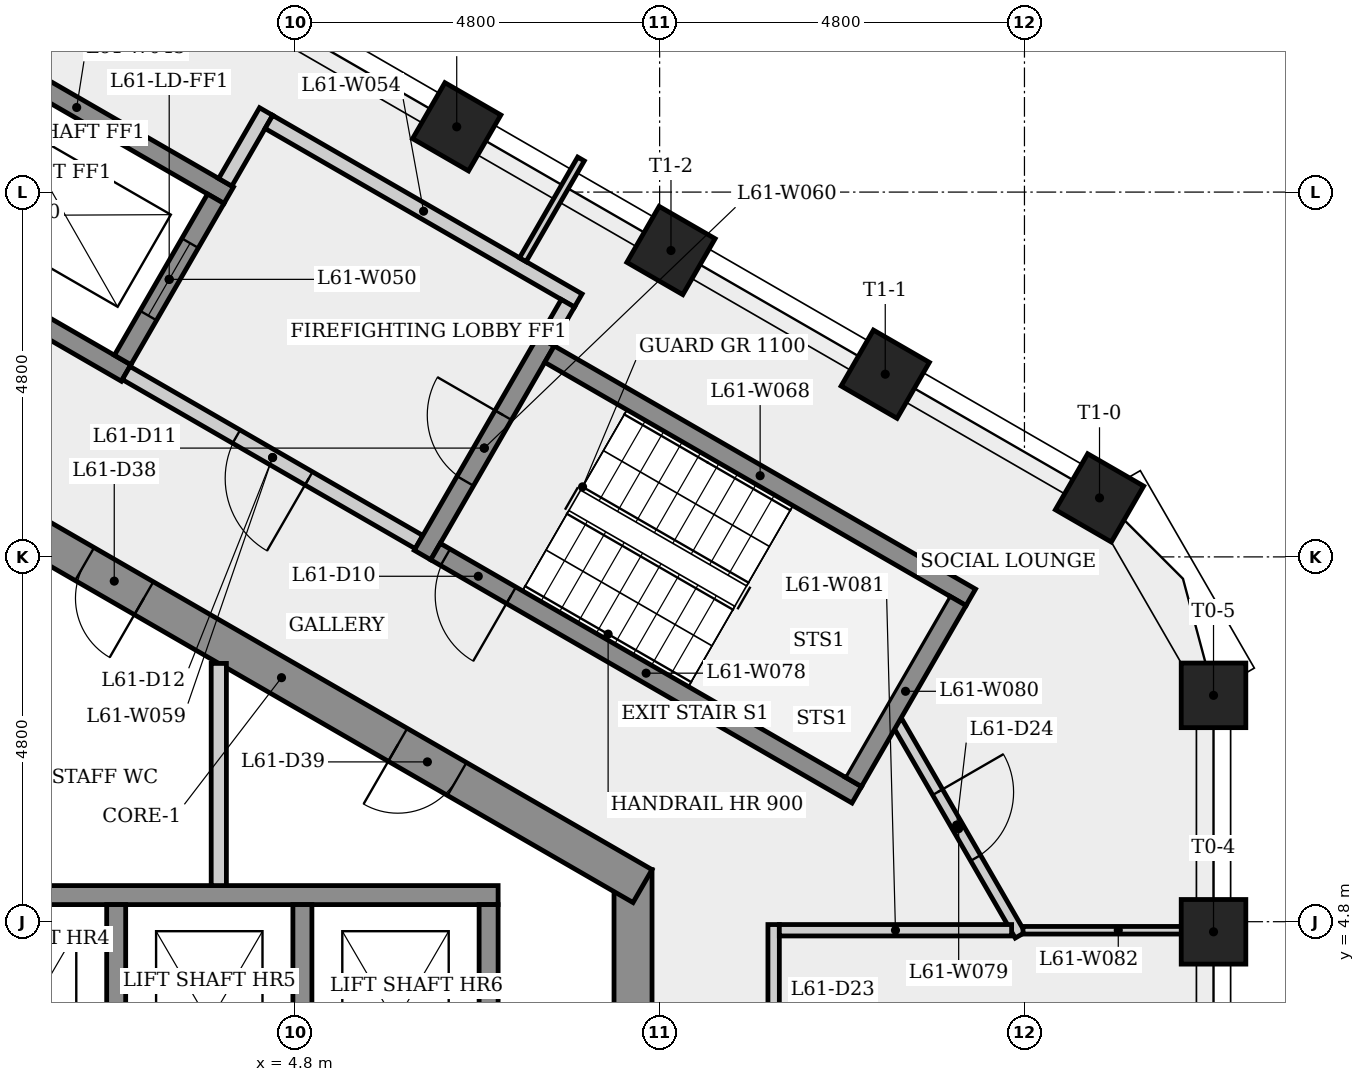
"""IFC4 building model, lengths in metres.
Left out: names, types, materials, properties, quantities, classifications, styles, units other than length and angle.
Written with IfcOpenShell. Run it as: python <this file> out.ifc"""

import sys

from ifc_helpers import new_model, si_unit, direction, frame, frame_2d, origin, origin_2d, place, context, subcontext, project, spatial, rectangle, extrude, element, fill, save


model = new_model("IFC4")
c1 = context("Model", 3, precision=1e-05, world=origin(), true_north=direction((0.0, 1.0)))
c2 = subcontext(c1, "Body", "Model", "MODEL_VIEW")
j1 = project(units=[si_unit("LENGTHUNIT", "METRE"), si_unit("PLANEANGLEUNIT", "RADIAN")], contexts=[c1])
p1 = place(None, origin())
s1 = spatial("IfcSite", under=j1, at=p1, CompositionType="ELEMENT")
p2 = place(p1, origin())
s2 = spatial("IfcBuilding", under=s1, at=p2, CompositionType="ELEMENT")
p3 = place(p2, frame((0.0, 0.0, 229.1)))
s3 = spatial("IfcBuildingStorey", under=s2, at=p3, CompositionType="ELEMENT", Elevation=229.1)
p4 = place(p3, frame((9.25, -5.485, 0.0), z_axis=(0.0, 0.0, 1.0), x_axis=(0.0, 1.0, 0.0)))
e1 = element("IfcWall", 1, at=p4, inside=s3, PredefinedType="SHEAR", context=c2, shape_type="SweptSolid", body=[
    extrude(rectangle(XDim=10.97, YDim=0.5, at=frame_2d((5.485, 0.0))), origin(), (0.0, 0.0, 1.0), 3.4),
])
p5 = place(p4, frame((4.685, 0.0, 0.0)))
e2 = element("IfcOpeningElement", 2, at=p5, cuts=e1, PredefinedType="OPENING", context=c2, shape_type="SweptSolid", body=[
    extrude(rectangle(XDim=1.6, YDim=2.1, at=frame_2d((0.8, 1.05))), frame((0.0, 0.26, 0.0), z_axis=(0.0, -1.0, 0.0), x_axis=(1.0, 0.0, 0.0)), (0.0, 0.0, 1.0), 0.52),
])
p6 = place(p3, frame((9.375, 5.268, 0.0), z_axis=(0.0, 0.0, 1.0), x_axis=(-0.866023993627, 0.500002442456, 0.0)))
e3 = element("IfcWall", 3, at=p6, inside=s3, PredefinedType="SHEAR", context=c2, shape_type="SweptSolid", body=[
    extrude(rectangle(XDim=10.97, YDim=0.5, at=frame_2d((5.485, 0.0))), origin(), (0.0, 0.0, 1.0), 3.4),
])
p7 = place(p6, frame((7.576, 0.0, 0.0)))
e4 = element("IfcOpeningElement", 4, at=p7, cuts=e3, PredefinedType="OPENING", context=c2, shape_type="SweptSolid", body=[
    extrude(rectangle(XDim=0.9, YDim=2.1, at=frame_2d((0.45, 1.05))), frame((0.0, 0.26, 0.0), z_axis=(0.0, -1.0, 0.0), x_axis=(1.0, 0.0, 0.0)), (0.0, 0.0, 1.0), 0.52),
])
p8 = place(p6, frame((2.818, 0.0, 0.0)))
e5 = element("IfcOpeningElement", 5, at=p8, cuts=e3, PredefinedType="OPENING", context=c2, shape_type="SweptSolid", body=[
    extrude(rectangle(XDim=0.9, YDim=2.1, at=frame_2d((0.45, 1.05))), frame((0.0, 0.26, 0.0), z_axis=(0.0, -1.0, 0.0), x_axis=(1.0, 0.0, 0.0)), (0.0, 0.0, 1.0), 0.52),
])
for number, where, z_axis, x_axis in (
    (6, (16.887, 4.667, 0.0), (0.0, 0.0, 1.0), (1.0, 0.0, 0.0)),
    (7, (16.887, 7.778, 0.0), (0.0, 0.0, 1.0), (1.0, 0.0, 0.0)),
    (8, (15.387, 10.376, 0.0), (0.0, 0.0, 1.0), (0.5, 0.866, 0.0)),
    (9, (12.568, 12.004, 0.0), (0.0, 0.0, 1.0), (0.5, 0.866, 0.0)),
    (10, (9.75, 13.631, 0.0), (0.0, 0.0, 1.0), (0.5, 0.866, 0.0)),
    (11, (6.93, 15.259, 0.0), (0.0, 0.0, 1.0), (0.5, 0.866, 0.0)),
):
    element("IfcColumn", number, at=place(p3, frame(where, z_axis=z_axis, x_axis=x_axis)), inside=s3, PredefinedType="COLUMN", context=c2, shape_type="SweptSolid", body=[
        extrude(rectangle(XDim=0.85, YDim=0.85, at=origin_2d()), origin(), (0.0, 0.0, 1.0), 3.4),
    ])
p9 = place(p3, frame((-7.225, 5.15, 0.0), z_axis=(0.0, 0.0, 1.0), x_axis=(1.0, 0.0, 0.0)))
e12 = element("IfcWall", 12, at=p9, inside=s3, PredefinedType="SHEAR", context=c2, shape_type="SweptSolid", body=[
    extrude(rectangle(XDim=14.7, YDim=0.25, at=frame_2d((7.35, 0.0))), origin(), (0.0, 0.0, 1.0), 3.05),
])
p10 = place(p3, frame((1.073, 16.008, 0.0), z_axis=(0.0, 0.0, 1.0), x_axis=(0.866040211805, -0.499974350878, 0.0)))
e13 = element("IfcWall", 13, at=p10, inside=s3, PredefinedType="SHEAR", context=c2, shape_type="SweptSolid", body=[
    extrude(rectangle(XDim=3.3, YDim=0.25, at=frame_2d((1.65, 0.0))), origin(), (0.0, 0.0, 1.0), 3.05),
])
p11 = place(p3, frame((2.45, 5.025, 0.0), z_axis=(0.0, 0.0, 1.0), x_axis=(0.0, -1.0, 0.0)))
e14 = element("IfcWall", 14, at=p11, inside=s3, PredefinedType="SHEAR", context=c2, shape_type="SweptSolid", body=[
    extrude(rectangle(XDim=3.1, YDim=0.25, at=frame_2d((1.55, 0.0))), origin(), (0.0, 0.0, 1.0), 3.4),
])
p12 = place(p3, frame((2.581, 12.02, 0.0), z_axis=(0.0, 0.0, 1.0), x_axis=(-0.866040211805, 0.499974350878, 0.0)))
e15 = element("IfcWall", 15, at=p12, inside=s3, PredefinedType="SHEAR", context=c2, shape_type="SweptSolid", body=[
    extrude(rectangle(XDim=3.3, YDim=0.25, at=frame_2d((1.65, 0.0))), origin(), (0.0, 0.0, 1.0), 3.05),
])
p13 = place(p3, frame((2.535, 12.191, 0.0), z_axis=(0.0, 0.0, 1.0), x_axis=(0.500061746146, 0.865989751695, 0.0)))
e16 = element("IfcWall", 16, at=p13, inside=s3, PredefinedType="SHEAR", context=c2, shape_type="SweptSolid", body=[
    extrude(rectangle(XDim=2.45, YDim=0.25, at=frame_2d((1.225, 0.0))), origin(), (0.0, 0.0, 1.0), 3.4),
])
p14 = place(p13, frame((0.675, 0.0, 0.0)))
e17 = element("IfcOpeningElement", 17, at=p14, cuts=e16, PredefinedType="OPENING", context=c2, shape_type="SweptSolid", body=[
    extrude(rectangle(XDim=1.1, YDim=2.1, at=frame_2d((0.55, 1.05))), frame((0.0, 0.135, 0.0), z_axis=(0.0, -1.0, 0.0), x_axis=(1.0, 0.0, 0.0)), (0.0, 0.0, 1.0), 0.27),
])
p15 = place(p3, frame((3.8, 8.198, 0.0), z_axis=(0.0, 0.0, 1.0), x_axis=(0.0, -1.0, 0.0)))
e18 = element("IfcWall", 18, at=p15, inside=s3, PredefinedType="PARTITIONING", context=c2, shape_type="SweptSolid", body=[
    extrude(rectangle(XDim=2.924, YDim=0.2, at=frame_2d((1.462, 0.0))), origin(), (0.0, 0.0, 1.0), 3.05),
])
p16 = place(p3, frame((3.885, 14.529, 0.0), z_axis=(0.0, 0.0, 1.0), x_axis=(0.499997628298, 0.866026773083, 0.0)))
e19 = element("IfcWall", 19, at=p16, inside=s3, PredefinedType="PARTITIONING", context=c2, shape_type="SweptSolid", body=[
    extrude(rectangle(XDim=1.075, YDim=0.2, at=frame_2d((0.538, 0.0))), origin(), (0.0, 0.0, 1.0), 3.05),
])
p17 = place(p3, frame((4.459, 15.323, 0.0), z_axis=(0.0, 0.0, 1.0), x_axis=(0.866016039709, -0.500016218704, 0.0)))
e20 = element("IfcWall", 20, at=p17, inside=s3, PredefinedType="PARTITIONING", context=c2, shape_type="SweptSolid", body=[
    extrude(rectangle(XDim=4.7, YDim=0.2, at=frame_2d((2.35, 0.0))), origin(), (0.0, 0.0, 1.0), 3.05),
])
p18 = place(p3, frame((4.9, 5.025, 0.0), z_axis=(0.0, 0.0, 1.0), x_axis=(0.0, -1.0, 0.0)))
e21 = element("IfcWall", 21, at=p18, inside=s3, PredefinedType="SHEAR", context=c2, shape_type="SweptSolid", body=[
    extrude(rectangle(XDim=3.1, YDim=0.25, at=frame_2d((1.55, 0.0))), origin(), (0.0, 0.0, 1.0), 3.4),
])
p19 = place(p3, frame((6.435, 9.795, 0.0), z_axis=(0.0, 0.0, 1.0), x_axis=(-0.866012907634, 0.500021643343, 0.0)))
e22 = element("IfcWall", 22, at=p19, inside=s3, PredefinedType="PARTITIONING", context=c2, shape_type="SweptSolid", body=[
    extrude(rectangle(XDim=4.45, YDim=0.2, at=frame_2d((2.225, 0.0))), origin(), (0.0, 0.0, 1.0), 3.05),
])
p20 = place(p19, frame((1.675, 0.0, 0.0)))
e23 = element("IfcOpeningElement", 23, at=p20, cuts=e22, PredefinedType="OPENING", context=c2, shape_type="SweptSolid", body=[
    extrude(rectangle(XDim=1.1, YDim=2.1, at=frame_2d((0.55, 1.05))), frame((0.0, 0.11, 0.0), z_axis=(0.0, -1.0, 0.0), x_axis=(1.0, 0.0, 0.0)), (0.0, 0.0, 1.0), 0.22),
])
p21 = place(p3, frame((6.48, 9.624, 0.0), z_axis=(0.0, 0.0, 1.0), x_axis=(0.500017246033, 0.866015446554, 0.0)))
e24 = element("IfcWall", 24, at=p21, inside=s3, PredefinedType="SHEAR", context=c2, shape_type="SweptSolid", body=[
    extrude(rectangle(XDim=3.25, YDim=0.25, at=frame_2d((1.625, 0.0))), origin(), (0.0, 0.0, 1.0), 3.05),
])
p22 = place(p21, frame((1.125, 0.0, 0.0)))
e25 = element("IfcOpeningElement", 25, at=p22, cuts=e24, PredefinedType="OPENING", context=c2, shape_type="SweptSolid", body=[
    extrude(rectangle(XDim=1.0, YDim=2.1, at=frame_2d((0.5, 1.05))), frame((0.0, 0.135, 0.0), z_axis=(0.0, -1.0, 0.0), x_axis=(1.0, 0.0, 0.0)), (0.0, 0.0, 1.0), 0.27),
])
p23 = place(p3, frame((7.35, 5.025, 0.0), z_axis=(0.0, 0.0, 1.0), x_axis=(0.0, -1.0, 0.0)))
e26 = element("IfcWall", 26, at=p23, inside=s3, PredefinedType="SHEAR", context=c2, shape_type="SweptSolid", body=[
    extrude(rectangle(XDim=3.1, YDim=0.25, at=frame_2d((1.55, 0.0))), origin(), (0.0, 0.0, 1.0), 3.4),
])
p24 = place(p3, frame((7.8, 13.51, 0.0), z_axis=(0.0, 0.0, 1.0), x_axis=(0.499948000906, 0.866055423394, 0.0)))
e27 = element("IfcWall", 27, at=p24, inside=s3, PredefinedType="PARTITIONING", context=c2, shape_type="SweptSolid", body=[
    extrude(rectangle(XDim=1.531, YDim=0.1, at=frame_2d((0.765, 0.0))), origin(), (0.0, 0.0, 1.0), 3.05),
])
p25 = place(p3, frame((8.151, 12.268, 0.0), z_axis=(0.0, 0.0, 1.0), x_axis=(0.866025499775, -0.499999833739, 0.0)))
e28 = element("IfcWall", 28, at=p25, inside=s3, PredefinedType="SHEAR", context=c2, shape_type="SweptSolid", body=[
    extrude(rectangle(XDim=6.4, YDim=0.25, at=frame_2d((3.2, 0.0))), origin(), (0.0, 0.0, 1.0), 3.05),
])
p26 = place(p3, frame((8.393, 12.937, 0.0), z_axis=(0.0, 0.0, 1.0), x_axis=(-0.500065409566, -0.86598763626, 0.0)))
e29 = element("IfcWall", 29, at=p26, inside=s3, PredefinedType="PARTITIONING", context=c2, shape_type="SweptSolid", body=[
    extrude(rectangle(XDim=0.575, YDim=0.2, at=frame_2d((0.288, 0.0))), origin(), (0.0, 0.0, 1.0), 3.05),
])
p27 = place(p3, frame((11.1, -4.612, 0.0), z_axis=(0.0, 0.0, 1.0), x_axis=(0.0, 1.0, 0.0)))
e30 = element("IfcWall", 30, at=p27, inside=s3, PredefinedType="PARTITIONING", context=c2, shape_type="SweptSolid", body=[
    extrude(rectangle(XDim=9.375, YDim=0.15, at=frame_2d((4.688, 0.0))), origin(), (0.0, 0.0, 1.0), 3.05),
])
p28 = place(p27, frame((1.01, 0.0, 0.0)))
e31 = element("IfcOpeningElement", 31, at=p28, cuts=e30, PredefinedType="OPENING", context=c2, shape_type="SweptSolid", body=[
    extrude(rectangle(XDim=1.0, YDim=2.1, at=frame_2d((0.5, 1.05))), frame((0.0, 0.085, 0.0), z_axis=(0.0, -1.0, 0.0), x_axis=(1.0, 0.0, 0.0)), (0.0, 0.0, 1.0), 0.17),
])
p29 = place(p27, frame((4.112, 0.0, 0.0)))
e32 = element("IfcOpeningElement", 32, at=p29, cuts=e30, PredefinedType="OPENING", context=c2, shape_type="SweptSolid", body=[
    extrude(rectangle(XDim=1.0, YDim=2.1, at=frame_2d((0.5, 1.05))), frame((0.0, 0.085, 0.0), z_axis=(0.0, -1.0, 0.0), x_axis=(1.0, 0.0, 0.0)), (0.0, 0.0, 1.0), 0.17),
])
p30 = place(p27, frame((7.237, 0.0, 0.0)))
e33 = element("IfcOpeningElement", 33, at=p30, cuts=e30, PredefinedType="OPENING", context=c2, shape_type="SweptSolid", body=[
    extrude(rectangle(XDim=1.0, YDim=2.1, at=frame_2d((0.5, 1.05))), frame((0.0, 0.085, 0.0), z_axis=(0.0, -1.0, 0.0), x_axis=(1.0, 0.0, 0.0)), (0.0, 0.0, 1.0), 0.17),
])
p31 = place(p3, frame((12.194, 6.47, 0.0), z_axis=(0.0, 0.0, 1.0), x_axis=(-0.866025499775, 0.499999833739, 0.0)))
e34 = element("IfcWall", 34, at=p31, inside=s3, PredefinedType="SHEAR", context=c2, shape_type="SweptSolid", body=[
    extrude(rectangle(XDim=6.4, YDim=0.25, at=frame_2d((3.2, 0.0))), origin(), (0.0, 0.0, 1.0), 3.05),
])
p32 = place(p31, frame((5.25, 0.0, 0.0)))
e35 = element("IfcOpeningElement", 35, at=p32, cuts=e34, PredefinedType="OPENING", context=c2, shape_type="SweptSolid", body=[
    extrude(rectangle(XDim=1.0, YDim=2.1, at=frame_2d((0.5, 1.05))), frame((0.0, 0.135, 0.0), z_axis=(0.0, -1.0, 0.0), x_axis=(1.0, 0.0, 0.0)), (0.0, 0.0, 1.0), 0.27),
])
p33 = place(p3, frame((12.726, 7.425, 0.0), z_axis=(0.0, 0.0, 1.0), x_axis=(0.50000982419, -0.866019731711, 0.0)))
e36 = element("IfcWall", 36, at=p33, inside=s3, PredefinedType="PARTITIONING", context=c2, shape_type="SweptSolid", body=[
    extrude(rectangle(XDim=3.236, YDim=0.15, at=frame_2d((1.618, 0.0))), origin(), (0.0, 0.0, 1.0), 3.05),
])
p34 = place(p33, frame((1.063, 0.0, 0.0)))
e37 = element("IfcOpeningElement", 37, at=p34, cuts=e36, PredefinedType="OPENING", context=c2, shape_type="SweptSolid", body=[
    extrude(rectangle(XDim=1.0, YDim=2.1, at=frame_2d((0.5, 1.05))), frame((0.0, 0.085, 0.0), z_axis=(0.0, -1.0, 0.0), x_axis=(1.0, 0.0, 0.0)), (0.0, 0.0, 1.0), 0.17),
])
p35 = place(p3, frame((12.148, 6.641, 0.0), z_axis=(0.0, 0.0, 1.0), x_axis=(0.500034990121, 0.866005201286, 0.0)))
e38 = element("IfcWall", 38, at=p35, inside=s3, PredefinedType="SHEAR", context=c2, shape_type="SweptSolid", body=[
    extrude(rectangle(XDim=2.75, YDim=0.25, at=frame_2d((1.375, 0.0))), origin(), (0.0, 0.0, 1.0), 3.05),
])
p36 = place(p3, frame((14.231, 4.688, 0.0), z_axis=(0.0, 0.0, 1.0), x_axis=(-1.0, 0.0, 0.0)))
e39 = element("IfcWall", 39, at=p36, inside=s3, PredefinedType="PARTITIONING", context=c2, shape_type="SweptSolid", body=[
    extrude(rectangle(XDim=3.056, YDim=0.15, at=frame_2d((1.528, 0.0))), origin(), (0.0, 0.0, 1.0), 3.05),
])
p37 = place(p3, frame((14.381, 4.688, 0.0), z_axis=(0.0, 0.0, 1.0), x_axis=(1.0, 0.0, 0.0)))
e40 = element("IfcWall", 40, at=p37, inside=s3, PredefinedType="PARTITIONING", context=c2, shape_type="SweptSolid", body=[
    extrude(rectangle(XDim=2.506, YDim=0.1, at=frame_2d((1.253, 0.0))), origin(), (0.0, 0.0, 1.0), 3.05),
])
p38 = place(p32, origin())
e41 = element("IfcDoor", 41, at=p38, inside=s3, OperationType="SINGLE_SWING_LEFT", PredefinedType="DOOR", context=c2, shape_type="SweptSolid", body=[
    extrude(rectangle(XDim=1.0, YDim=2.1, at=frame_2d((0.5, 1.05))), frame((0.0, 0.025, 0.0), z_axis=(0.0, -1.0, 0.0), x_axis=(1.0, 0.0, 0.0)), (0.0, 0.0, 1.0), 0.05),
])
fill(e35, e41)
p39 = place(p22, origin())
e42 = element("IfcDoor", 42, at=p39, inside=s3, OperationType="SINGLE_SWING_RIGHT", PredefinedType="DOOR", context=c2, shape_type="SweptSolid", body=[
    extrude(rectangle(XDim=1.0, YDim=2.1, at=frame_2d((0.5, 1.05))), frame((0.0, 0.025, 0.0), z_axis=(0.0, -1.0, 0.0), x_axis=(1.0, 0.0, 0.0)), (0.0, 0.0, 1.0), 0.05),
])
fill(e25, e42)
p40 = place(p20, origin())
e43 = element("IfcDoor", 43, at=p40, inside=s3, OperationType="SINGLE_SWING_LEFT", PredefinedType="DOOR", context=c2, shape_type="SweptSolid", body=[
    extrude(rectangle(XDim=1.1, YDim=2.1, at=frame_2d((0.55, 1.05))), frame((0.0, 0.025, 0.0), z_axis=(0.0, -1.0, 0.0), x_axis=(1.0, 0.0, 0.0)), (0.0, 0.0, 1.0), 0.05),
])
fill(e23, e43)
p41 = place(p14, origin())
e44 = element("IfcDoor", 44, at=p41, inside=s3, OperationType="SLIDING_TO_LEFT", PredefinedType="DOOR", context=c2, shape_type="SweptSolid", body=[
    extrude(rectangle(XDim=1.1, YDim=2.1, at=frame_2d((0.55, 1.05))), frame((0.0, 0.025, 0.0), z_axis=(0.0, -1.0, 0.0), x_axis=(1.0, 0.0, 0.0)), (0.0, 0.0, 1.0), 0.05),
])
fill(e17, e44)
p42 = place(p34, origin())
e45 = element("IfcDoor", 45, at=p42, inside=s3, OperationType="SINGLE_SWING_LEFT", PredefinedType="DOOR", context=c2, shape_type="SweptSolid", body=[
    extrude(rectangle(XDim=1.0, YDim=2.1, at=frame_2d((0.5, 1.05))), frame((0.0, 0.025, 0.0), z_axis=(0.0, -1.0, 0.0), x_axis=(1.0, 0.0, 0.0)), (0.0, 0.0, 1.0), 0.05),
])
fill(e37, e45)
p43 = place(p7, origin())
e46 = element("IfcDoor", 46, at=p43, inside=s3, OperationType="SINGLE_SWING_LEFT", PredefinedType="DOOR", context=c2, shape_type="SweptSolid", body=[
    extrude(rectangle(XDim=0.9, YDim=2.1, at=frame_2d((0.45, 1.05))), frame((0.0, 0.025, 0.0), z_axis=(0.0, -1.0, 0.0), x_axis=(1.0, 0.0, 0.0)), (0.0, 0.0, 1.0), 0.05),
])
fill(e4, e46)
p44 = place(p8, origin())
e47 = element("IfcDoor", 47, at=p44, inside=s3, OperationType="SINGLE_SWING_RIGHT", PredefinedType="DOOR", context=c2, shape_type="SweptSolid", body=[
    extrude(rectangle(XDim=0.9, YDim=2.1, at=frame_2d((0.45, 1.05))), frame((0.0, 0.025, 0.0), z_axis=(0.0, -1.0, 0.0), x_axis=(1.0, 0.0, 0.0)), (0.0, 0.0, 1.0), 0.05),
])
fill(e5, e47)
save(model, sys.argv[1])
